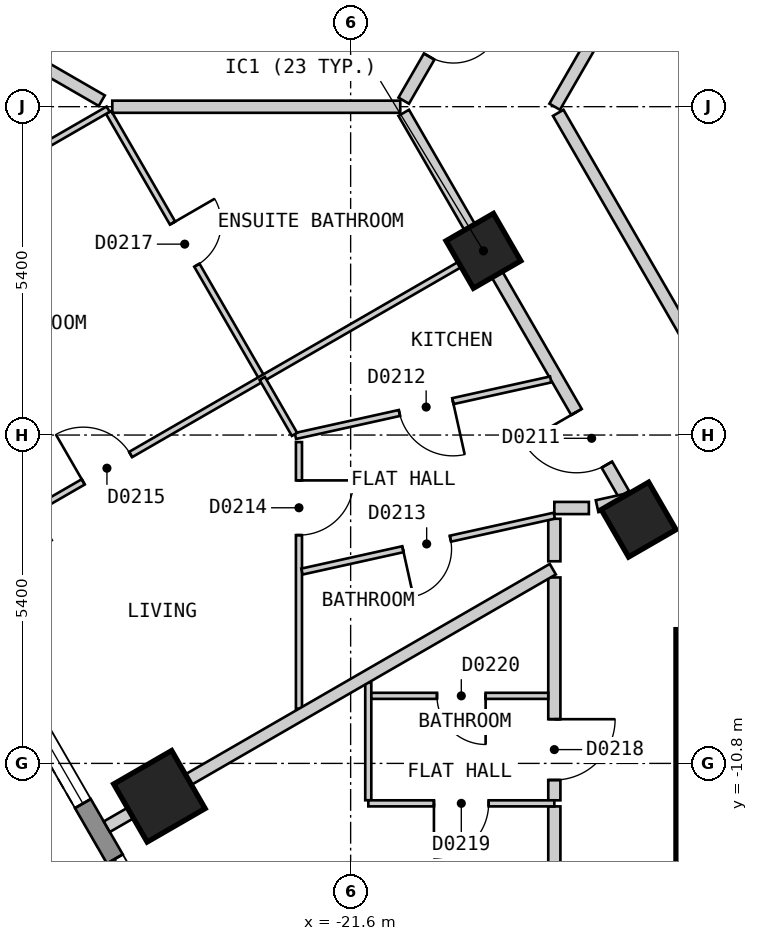
"""IFC4 building model, lengths in metres.
Left out: names, types, materials, properties, quantities, classifications, styles, units other than length and angle.
Written with IfcOpenShell. Run it as: python <this file> out.ifc"""

import sys

from ifc_helpers import new_model, si_unit, direction, frame, frame_2d, origin, origin_2d, place, context, subcontext, project, spatial, polyline, rectangle, outline, extrude, element, fill, save


model = new_model("IFC4")
c1 = context("Model", 3, precision=1e-05, world=origin(), true_north=direction((0.0, 1.0)))
c2 = subcontext(c1, "Body", "Model", "MODEL_VIEW")
j1 = project(units=[si_unit("LENGTHUNIT", "METRE"), si_unit("PLANEANGLEUNIT", "RADIAN")], contexts=[c1])
p1 = place(None, origin())
s1 = spatial("IfcSite", under=j1, at=p1, CompositionType="ELEMENT")
p2 = place(p1, origin())
s2 = spatial("IfcBuilding", under=s1, at=p2, CompositionType="ELEMENT")
p3 = place(p2, frame((0.0, 0.0, 41.4)))
s3 = spatial("IfcBuildingStorey", under=s2, at=p3, CompositionType="ELEMENT", Elevation=41.4)
p4 = place(p3, frame((-24.745, -11.341, 0.0), z_axis=(0.0, 0.0, 1.0), x_axis=(0.499984884929, -0.866034130299, 0.0)))
e1 = element("IfcColumn", 1, at=p4, inside=s3, PredefinedType="COLUMN", context=c2, shape_type="SweptSolid", body=[
    extrude(rectangle(XDim=1.1, YDim=1.1, at=origin_2d()), origin(), (0.0, 0.0, 1.0), 3.0),
])
for number, where, z_axis, x_axis in (
    (2, (-19.416, -2.371, 0.0), (0.0, 0.0, 1.0), (0.5, -0.866, 0.0)),
    (3, (-16.864, -6.791, 0.0), (0.0, 0.0, 1.0), (0.5, -0.866, 0.0)),
):
    element("IfcColumn", number, at=place(p3, frame(where, z_axis=z_axis, x_axis=x_axis)), inside=s3, PredefinedType="COLUMN", context=c2, shape_type="SweptSolid", body=[
        extrude(rectangle(XDim=0.9, YDim=0.9, at=origin_2d()), origin(), (0.0, 0.0, 1.0), 3.0),
    ])
p5 = place(p3, frame((-31.22, -2.425, 0.0), z_axis=(0.0, 0.0, 1.0), x_axis=(0.500001938803, -0.866024284413, 0.0)))
e4 = element("IfcWall", 4, at=p5, inside=s3, PredefinedType="SOLIDWALL", context=c2, shape_type="SweptSolid", body=[
    extrude(outline(polyline([(0.0, -0.15), (27.02, -0.15), (26.94, 0.15), (0.08, 0.15), (0.0, -0.15)])), origin(), (0.0, 0.0, 1.0), 2.7),
])
p6 = place(p5, frame((1.277, 0.0, 0.15)))
e5 = element("IfcOpeningElement", 5, at=p6, cuts=e4, PredefinedType="OPENING", context=c2, shape_type="SweptSolid", body=[
    extrude(rectangle(XDim=1.5, YDim=2.1, at=frame_2d((0.75, 1.05))), frame((0.0, 0.16, 0.0), z_axis=(0.0, -1.0, 0.0), x_axis=(1.0, 0.0, 0.0)), (0.0, 0.0, 1.0), 0.32),
])
p7 = place(p5, frame((3.829, 0.0, 0.15)))
e6 = element("IfcOpeningElement", 6, at=p7, cuts=e4, PredefinedType="OPENING", context=c2, shape_type="SweptSolid", body=[
    extrude(rectangle(XDim=1.5, YDim=2.1, at=frame_2d((0.75, 1.05))), frame((0.0, 0.16, 0.0), z_axis=(0.0, -1.0, 0.0), x_axis=(1.0, 0.0, 0.0)), (0.0, 0.0, 1.0), 0.32),
])
p8 = place(p5, frame((6.382, 0.0, 0.15)))
e7 = element("IfcOpeningElement", 7, at=p8, cuts=e4, PredefinedType="OPENING", context=c2, shape_type="SweptSolid", body=[
    extrude(rectangle(XDim=1.5, YDim=2.1, at=frame_2d((0.75, 1.05))), frame((0.0, 0.16, 0.0), z_axis=(0.0, -1.0, 0.0), x_axis=(1.0, 0.0, 0.0)), (0.0, 0.0, 1.0), 0.32),
])
p9 = place(p5, frame((8.933, 0.0, 0.15)))
e8 = element("IfcOpeningElement", 8, at=p9, cuts=e4, PredefinedType="OPENING", context=c2, shape_type="SweptSolid", body=[
    extrude(rectangle(XDim=1.5, YDim=2.1, at=frame_2d((0.75, 1.05))), frame((0.0, 0.16, 0.0), z_axis=(0.0, -1.0, 0.0), x_axis=(1.0, 0.0, 0.0)), (0.0, 0.0, 1.0), 0.32),
])
p10 = place(p5, frame((11.485, 0.0, 0.15)))
e9 = element("IfcOpeningElement", 9, at=p10, cuts=e4, PredefinedType="OPENING", context=c2, shape_type="SweptSolid", body=[
    extrude(rectangle(XDim=1.5, YDim=2.1, at=frame_2d((0.75, 1.05))), frame((0.0, 0.16, 0.0), z_axis=(0.0, -1.0, 0.0), x_axis=(1.0, 0.0, 0.0)), (0.0, 0.0, 1.0), 0.32),
])
p11 = place(p5, frame((14.037, 0.0, 0.15)))
e10 = element("IfcOpeningElement", 10, at=p11, cuts=e4, PredefinedType="OPENING", context=c2, shape_type="SweptSolid", body=[
    extrude(rectangle(XDim=1.5, YDim=2.1, at=frame_2d((0.75, 1.05))), frame((0.0, 0.16, 0.0), z_axis=(0.0, -1.0, 0.0), x_axis=(1.0, 0.0, 0.0)), (0.0, 0.0, 1.0), 0.32),
])
p12 = place(p5, frame((16.589, 0.0, 0.15)))
e11 = element("IfcOpeningElement", 11, at=p12, cuts=e4, PredefinedType="OPENING", context=c2, shape_type="SweptSolid", body=[
    extrude(rectangle(XDim=1.5, YDim=2.1, at=frame_2d((0.75, 1.05))), frame((0.0, 0.16, 0.0), z_axis=(0.0, -1.0, 0.0), x_axis=(1.0, 0.0, 0.0)), (0.0, 0.0, 1.0), 0.32),
])
p13 = place(p5, frame((19.141, 0.0, 0.15)))
e12 = element("IfcOpeningElement", 12, at=p13, cuts=e4, PredefinedType="OPENING", context=c2, shape_type="SweptSolid", body=[
    extrude(rectangle(XDim=1.5, YDim=2.1, at=frame_2d((0.75, 1.05))), frame((0.0, 0.16, 0.0), z_axis=(0.0, -1.0, 0.0), x_axis=(1.0, 0.0, 0.0)), (0.0, 0.0, 1.0), 0.32),
])
p14 = place(p5, frame((21.693, 0.0, 0.15)))
e13 = element("IfcOpeningElement", 13, at=p14, cuts=e4, PredefinedType="OPENING", context=c2, shape_type="SweptSolid", body=[
    extrude(rectangle(XDim=1.5, YDim=2.1, at=frame_2d((0.75, 1.05))), frame((0.0, 0.16, 0.0), z_axis=(0.0, -1.0, 0.0), x_axis=(1.0, 0.0, 0.0)), (0.0, 0.0, 1.0), 0.32),
])
p15 = place(p5, frame((24.244, 0.0, 0.15)))
e14 = element("IfcOpeningElement", 14, at=p15, cuts=e4, PredefinedType="OPENING", context=c2, shape_type="SweptSolid", body=[
    extrude(rectangle(XDim=1.5, YDim=2.1, at=frame_2d((0.75, 1.05))), frame((0.0, 0.16, 0.0), z_axis=(0.0, -1.0, 0.0), x_axis=(1.0, 0.0, 0.0)), (0.0, 0.0, 1.0), 0.32),
])
p16 = place(p3, frame((-18.186, -0.101, 0.0), z_axis=(0.0, 0.0, 1.0), x_axis=(0.499997591167, -0.86602679452, 0.0)))
e15 = element("IfcWall", 15, at=p16, inside=s3, PredefinedType="PARTITIONING", context=c2, shape_type="SweptSolid", body=[
    extrude(rectangle(XDim=5.172, YDim=0.2, at=frame_2d((2.586, 0.0))), origin(), (0.0, 0.0, 1.0), 2.7),
])
p17 = place(p3, frame((-20.727, -0.101, 0.0), z_axis=(0.0, 0.0, 1.0), x_axis=(0.500070814966, -0.865984514884, 0.0)))
e16 = element("IfcWall", 16, at=p17, inside=s3, PredefinedType="PARTITIONING", context=c2, shape_type="SweptSolid", body=[
    extrude(rectangle(XDim=7.239, YDim=0.2, at=frame_2d((3.62, 0.0))), origin(), (0.0, 0.0, 1.0), 2.7),
])
p18 = place(p17, frame((5.681, 0.0, 0.0)))
e17 = element("IfcOpeningElement", 17, at=p18, cuts=e16, PredefinedType="OPENING", context=c2, shape_type="SweptSolid", body=[
    extrude(rectangle(XDim=1.0, YDim=2.1, at=frame_2d((0.5, 1.05))), frame((0.0, 0.11, 0.0), z_axis=(0.0, -1.0, 0.0), x_axis=(1.0, 0.0, 0.0)), (0.0, 0.0, 1.0), 0.22),
])
p19 = place(p3, frame((-18.25, -11.507, 0.0), z_axis=(0.0, 0.0, 1.0), x_axis=(0.0, -1.0, 0.0)))
e18 = element("IfcWall", 18, at=p19, inside=s3, PredefinedType="PARTITIONING", context=c2, shape_type="SweptSolid", body=[
    extrude(rectangle(XDim=4.792, YDim=0.2, at=frame_2d((2.396, 0.0))), origin(), (0.0, 0.0, 1.0), 2.7),
])
p20 = place(p3, frame((-18.25, -6.6, 0.0), z_axis=(0.0, 0.0, 1.0), x_axis=(1.0, 0.0, 0.0)))
e19 = element("IfcWall", 19, at=p20, inside=s3, PredefinedType="PARTITIONING", context=c2, shape_type="SweptSolid", body=[
    extrude(rectangle(XDim=0.568, YDim=0.2, at=frame_2d((0.284, 0.0))), origin(), (0.0, 0.0, 1.0), 2.7),
])
p21 = place(p3, frame((-18.244, -0.001, 0.0), z_axis=(0.0, 0.0, 1.0), x_axis=(0.499962999376, 0.866046765051, 0.0)))
e20 = element("IfcWall", 20, at=p21, inside=s3, PredefinedType="PARTITIONING", context=c2, shape_type="SweptSolid", body=[
    extrude(rectangle(XDim=18.245, YDim=0.2, at=frame_2d((9.123, 0.0))), origin(), (0.0, 0.0, 1.0), 2.7),
])
p22 = place(p21, frame((8.672, 0.0, 0.0)))
e21 = element("IfcOpeningElement", 21, at=p22, cuts=e20, PredefinedType="OPENING", context=c2, shape_type="SweptSolid", body=[
    extrude(rectangle(XDim=0.9, YDim=2.1, at=frame_2d((0.45, 1.05))), frame((0.0, 0.11, 0.0), z_axis=(0.0, -1.0, 0.0), x_axis=(1.0, 0.0, 0.0)), (0.0, 0.0, 1.0), 0.22),
])
p23 = place(p3, frame((-20.727, 0.099, 0.0), z_axis=(0.0, 0.0, 1.0), x_axis=(0.499993204491, 0.866029327138, 0.0)))
e22 = element("IfcWall", 22, at=p23, inside=s3, PredefinedType="PARTITIONING", context=c2, shape_type="SweptSolid", body=[
    extrude(rectangle(XDim=20.554, YDim=0.2, at=frame_2d((10.277, 0.0))), origin(), (0.0, 0.0, 1.0), 2.7),
])
p24 = place(p23, frame((14.88, 0.0, 0.0)))
e23 = element("IfcOpeningElement", 23, at=p24, cuts=e22, PredefinedType="OPENING", context=c2, shape_type="SweptSolid", body=[
    extrude(rectangle(XDim=1.0, YDim=2.1, at=frame_2d((0.5, 1.05))), frame((0.0, 0.11, 0.0), z_axis=(0.0, -1.0, 0.0), x_axis=(1.0, 0.0, 0.0)), (0.0, 0.0, 1.0), 0.22),
])
p25 = place(p23, frame((4.673, 0.0, 0.0)))
e24 = element("IfcOpeningElement", 24, at=p25, cuts=e22, PredefinedType="OPENING", context=c2, shape_type="SweptSolid", body=[
    extrude(rectangle(XDim=1.0, YDim=2.1, at=frame_2d((0.5, 1.05))), frame((0.0, 0.11, 0.0), z_axis=(0.0, -1.0, 0.0), x_axis=(1.0, 0.0, 0.0)), (0.0, 0.0, 1.0), 0.22),
])
p26 = place(p23, frame((0.838, 0.0, 0.0)))
e25 = element("IfcOpeningElement", 25, at=p26, cuts=e22, PredefinedType="OPENING", context=c2, shape_type="SweptSolid", body=[
    extrude(rectangle(XDim=0.8, YDim=2.1, at=frame_2d((0.4, 1.05))), frame((0.0, 0.11, 0.0), z_axis=(0.0, -1.0, 0.0), x_axis=(1.0, 0.0, 0.0)), (0.0, 0.0, 1.0), 0.22),
])
p27 = place(p3, frame((-18.25, -11.407, 0.0), z_axis=(0.0, 0.0, 1.0), x_axis=(0.0, 1.0, 0.0)))
e26 = element("IfcWall", 26, at=p27, inside=s3, PredefinedType="PARTITIONING", context=c2, shape_type="SweptSolid", body=[
    extrude(rectangle(XDim=3.665, YDim=0.2, at=frame_2d((1.833, 0.0))), origin(), (0.0, 0.0, 1.0), 2.7),
])
p28 = place(p27, frame((0.334, 0.0, 0.0)))
e27 = element("IfcOpeningElement", 27, at=p28, cuts=e26, PredefinedType="OPENING", context=c2, shape_type="SweptSolid", body=[
    extrude(rectangle(XDim=1.0, YDim=2.1, at=frame_2d((0.5, 1.05))), frame((0.0, 0.11, 0.0), z_axis=(0.0, -1.0, 0.0), x_axis=(1.0, 0.0, 0.0)), (0.0, 0.0, 1.0), 0.22),
])
p29 = place(p3, frame((-18.25, -7.476, 0.0), z_axis=(0.0, 0.0, 1.0), x_axis=(0.0, 1.0, 0.0)))
e28 = element("IfcWall", 28, at=p29, inside=s3, PredefinedType="PARTITIONING", context=c2, shape_type="SweptSolid", body=[
    extrude(rectangle(XDim=0.699, YDim=0.2, at=frame_2d((0.35, 0.0))), origin(), (0.0, 0.0, 1.0), 2.7),
])
p30 = place(p3, frame((-25.58, -0.094, 0.0), z_axis=(0.0, 0.0, 1.0), x_axis=(0.500093258202, -0.865971554441, 0.0)))
e29 = element("IfcWall", 29, at=p30, inside=s3, PredefinedType="PARTITIONING", context=c2, shape_type="SweptSolid", body=[
    extrude(rectangle(XDim=5.053, YDim=0.1, at=frame_2d((2.527, 0.0))), origin(), (0.0, 0.0, 1.0), 2.7),
])
p31 = place(p30, frame((2.102, 0.0, 0.0)))
e30 = element("IfcOpeningElement", 30, at=p31, cuts=e29, PredefinedType="OPENING", context=c2, shape_type="SweptSolid", body=[
    extrude(rectangle(XDim=0.8, YDim=2.1, at=frame_2d((0.4, 1.05))), frame((0.0, 0.06, 0.0), z_axis=(0.0, -1.0, 0.0), x_axis=(1.0, 0.0, 0.0)), (0.0, 0.0, 1.0), 0.12),
])
p32 = place(p3, frame((-21.31, -9.474, 0.0), z_axis=(0.0, 0.0, 1.0), x_axis=(0.0, -1.0, 0.0)))
e31 = element("IfcWall", 31, at=p32, inside=s3, PredefinedType="PARTITIONING", context=c2, shape_type="SweptSolid", body=[
    extrude(rectangle(XDim=1.932, YDim=0.1, at=frame_2d((0.966, 0.0))), origin(), (0.0, 0.0, 1.0), 2.7),
])
p33 = place(p3, frame((-21.26, -9.689, 0.0), z_axis=(0.0, 0.0, 1.0), x_axis=(1.0, 0.0, 0.0)))
e32 = element("IfcWall", 32, at=p33, inside=s3, PredefinedType="PARTITIONING", context=c2, shape_type="SweptSolid", body=[
    extrude(rectangle(XDim=2.91, YDim=0.1, at=frame_2d((1.455, 0.0))), origin(), (0.0, 0.0, 1.0), 2.7),
])
p34 = place(p33, frame((1.08, 0.0, 0.0)))
e33 = element("IfcOpeningElement", 33, at=p34, cuts=e32, PredefinedType="OPENING", context=c2, shape_type="SweptSolid", body=[
    extrude(rectangle(XDim=0.8, YDim=2.1, at=frame_2d((0.4, 1.05))), frame((0.0, 0.06, 0.0), z_axis=(0.0, -1.0, 0.0), x_axis=(1.0, 0.0, 0.0)), (0.0, 0.0, 1.0), 0.12),
])
p35 = place(p3, frame((-21.309, -11.457, 0.0), z_axis=(0.0, 0.0, 1.0), x_axis=(1.0, 0.0, 0.0)))
e34 = element("IfcWall", 34, at=p35, inside=s3, PredefinedType="PARTITIONING", context=c2, shape_type="SweptSolid", body=[
    extrude(rectangle(XDim=3.059, YDim=0.1, at=frame_2d((1.53, 0.0))), origin(), (0.0, 0.0, 1.0), 2.7),
])
p36 = place(p35, frame((1.079, 0.0, 0.0)))
e35 = element("IfcOpeningElement", 35, at=p36, cuts=e34, PredefinedType="OPENING", context=c2, shape_type="SweptSolid", body=[
    extrude(rectangle(XDim=0.9, YDim=2.1, at=frame_2d((0.45, 1.05))), frame((0.0, 0.06, 0.0), z_axis=(0.0, -1.0, 0.0), x_axis=(1.0, 0.0, 0.0)), (0.0, 0.0, 1.0), 0.12),
])
p37 = place(p3, frame((-22.45, -9.901, 0.0), z_axis=(0.0, 0.0, 1.0), x_axis=(0.0, 1.0, 0.0)))
e36 = element("IfcWall", 36, at=p37, inside=s3, PredefinedType="PARTITIONING", context=c2, shape_type="SweptSolid", body=[
    extrude(rectangle(XDim=4.385, YDim=0.1, at=frame_2d((2.192, 0.0))), origin(), (0.0, 0.0, 1.0), 2.7),
])
p38 = place(p37, frame((2.855, 0.0, 0.0)))
e37 = element("IfcOpeningElement", 37, at=p38, cuts=e36, PredefinedType="OPENING", context=c2, shape_type="SweptSolid", body=[
    extrude(rectangle(XDim=0.9, YDim=2.1, at=frame_2d((0.45, 1.05))), frame((0.0, 0.06, 0.0), z_axis=(0.0, -1.0, 0.0), x_axis=(1.0, 0.0, 0.0)), (0.0, 0.0, 1.0), 0.12),
])
p39 = place(p3, frame((-22.508, -5.416, 0.0), z_axis=(0.0, 0.0, 1.0), x_axis=(0.976332464286, 0.216275100696, 0.0)))
e38 = element("IfcWall", 38, at=p39, inside=s3, PredefinedType="PARTITIONING", context=c2, shape_type="SweptSolid", body=[
    extrude(rectangle(XDim=4.3, YDim=0.1, at=frame_2d((2.15, 0.0))), origin(), (0.0, 0.0, 1.0), 2.7),
])
p40 = place(p39, frame((1.752, 0.0, 0.0)))
e39 = element("IfcOpeningElement", 39, at=p40, cuts=e38, PredefinedType="OPENING", context=c2, shape_type="SweptSolid", body=[
    extrude(rectangle(XDim=0.9, YDim=2.1, at=frame_2d((0.45, 1.05))), frame((0.0, 0.06, 0.0), z_axis=(0.0, -1.0, 0.0), x_axis=(1.0, 0.0, 0.0)), (0.0, 0.0, 1.0), 0.12),
])
p41 = place(p3, frame((-22.4, -7.645, 0.0), z_axis=(0.0, 0.0, 1.0), x_axis=(0.97634896822, 0.216200583385, 0.0)))
e40 = element("IfcWall", 40, at=p41, inside=s3, PredefinedType="PARTITIONING", context=c2, shape_type="SweptSolid", body=[
    extrude(rectangle(XDim=4.25, YDim=0.1, at=frame_2d((2.125, 0.0))), origin(), (0.0, 0.0, 1.0), 2.7),
])
p42 = place(p41, frame((1.7, 0.0, 0.0)))
e41 = element("IfcOpeningElement", 41, at=p42, cuts=e40, PredefinedType="OPENING", context=c2, shape_type="SweptSolid", body=[
    extrude(rectangle(XDim=0.8, YDim=2.1, at=frame_2d((0.4, 1.05))), frame((0.0, 0.06, 0.0), z_axis=(0.0, -1.0, 0.0), x_axis=(1.0, 0.0, 0.0)), (0.0, 0.0, 1.0), 0.12),
])
p43 = place(p3, frame((-28.163, -7.42, 0.0), z_axis=(0.0, 0.0, 1.0), x_axis=(0.866065245018, 0.499930986609, 0.0)))
e42 = element("IfcWall", 42, at=p43, inside=s3, PredefinedType="PARTITIONING", context=c2, shape_type="SweptSolid", body=[
    extrude(rectangle(XDim=10.0, YDim=0.1, at=frame_2d((5.0, 0.0))), origin(), (0.0, 0.0, 1.0), 2.7),
])
p44 = place(p43, frame((2.5, 0.0, 0.0)))
e43 = element("IfcOpeningElement", 43, at=p44, cuts=e42, PredefinedType="OPENING", context=c2, shape_type="SweptSolid", body=[
    extrude(rectangle(XDim=0.9, YDim=2.1, at=frame_2d((0.45, 1.05))), frame((0.0, 0.06, 0.0), z_axis=(0.0, -1.0, 0.0), x_axis=(1.0, 0.0, 0.0)), (0.0, 0.0, 1.0), 0.12),
])
p45 = place(p3, frame((-30.715, -3.0, 0.0), z_axis=(0.0, 0.0, 1.0), x_axis=(0.866113484451, 0.499847408768, 0.0)))
e44 = element("IfcWall", 44, at=p45, inside=s3, PredefinedType="PARTITIONING", context=c2, shape_type="SweptSolid", body=[
    extrude(rectangle(XDim=5.92, YDim=0.1, at=frame_2d((2.96, 0.0))), origin(), (0.0, 0.0, 1.0), 2.7),
])
p46 = place(p45, frame((2.51, 0.0, 0.0)))
e45 = element("IfcOpeningElement", 45, at=p46, cuts=e44, PredefinedType="OPENING", context=c2, shape_type="SweptSolid", body=[
    extrude(rectangle(XDim=0.9, YDim=2.1, at=frame_2d((0.45, 1.05))), frame((0.0, 0.06, 0.0), z_axis=(0.0, -1.0, 0.0), x_axis=(1.0, 0.0, 0.0)), (0.0, 0.0, 1.0), 0.12),
])
p47 = place(p3, frame((-30.716, 2.999, 0.0), z_axis=(0.0, 0.0, 1.0), x_axis=(0.866032775405, -0.499987231761, 0.0)))
e46 = element("IfcWall", 46, at=p47, inside=s3, PredefinedType="PARTITIONING", context=c2, shape_type="SweptSolid", body=[
    extrude(rectangle(XDim=5.8, YDim=0.2, at=frame_2d((2.9, 0.0))), origin(), (0.0, 0.0, 1.0), 2.7),
])
p48 = place(p3, frame((-25.52, -0.001, 0.0), z_axis=(0.0, 0.0, 1.0), x_axis=(1.0, 0.0, 0.0)))
e47 = element("IfcWall", 47, at=p48, inside=s3, PredefinedType="PARTITIONING", context=c2, shape_type="SweptSolid", body=[
    extrude(rectangle(XDim=4.736, YDim=0.2, at=frame_2d((2.368, 0.0))), origin(), (0.0, 0.0, 1.0), 2.7),
])
p49 = place(p3, frame((-17.547, -6.57, 0.0), z_axis=(0.0, 0.0, 1.0), x_axis=(0.97647747569, 0.215619432033, 0.0)))
e48 = element("IfcWall", 48, at=p49, inside=s3, PredefinedType="PARTITIONING", context=c2, shape_type="SweptSolid", body=[
    extrude(rectangle(XDim=0.473, YDim=0.2, at=frame_2d((0.237, 0.0))), origin(), (0.0, 0.0, 1.0), 2.7),
])
p50 = place(p3, frame((-25.61, -11.841, 0.0), z_axis=(0.0, 0.0, 1.0), x_axis=(0.866019023803, 0.500011050288, 0.0)))
e49 = element("IfcWall", 49, at=p50, inside=s3, PredefinedType="PARTITIONING", context=c2, shape_type="SweptSolid", body=[
    extrude(rectangle(XDim=8.47, YDim=0.2, at=frame_2d((4.235, 0.0))), origin(), (0.0, 0.0, 1.0), 2.7),
])
p51 = place(p3, frame((-23.053, -4.47, 0.0), z_axis=(0.0, 0.0, 1.0), x_axis=(0.499629475903, -0.866239220313, 0.0)))
e50 = element("IfcWall", 50, at=p51, inside=s3, PredefinedType="PARTITIONING", context=c2, shape_type="SweptSolid", body=[
    extrude(rectangle(XDim=1.061, YDim=0.1, at=frame_2d((0.53, 0.0))), origin(), (0.0, 0.0, 1.0), 2.7),
])
p52 = place(p3, frame((-16.15, -14.4, 0.0), z_axis=(0.0, 0.0, 1.0), x_axis=(0.0, 1.0, 0.0)))
e51 = element("IfcWall", 51, at=p52, inside=s3, PredefinedType="SOLIDWALL", context=c2, shape_type="SweptSolid", body=[
    extrude(rectangle(XDim=5.8, YDim=0.2, at=frame_2d((2.9, 0.0))), origin(), (0.0, 0.0, 1.0), 2.7),
])
p53 = place(p9, origin())
e52 = element("IfcWindow", 52, at=p53, inside=s3, PartitioningType="SINGLE_PANEL", PredefinedType="WINDOW", context=c2, shape_type="SweptSolid", body=[
    extrude(rectangle(XDim=1.5, YDim=2.1, at=frame_2d((0.75, 1.05))), frame((0.0, 0.03, 0.0), z_axis=(0.0, -1.0, 0.0), x_axis=(1.0, 0.0, 0.0)), (0.0, 0.0, 1.0), 0.06),
])
fill(e8, e52)
p54 = place(p10, origin())
e53 = element("IfcWindow", 53, at=p54, inside=s3, PartitioningType="SINGLE_PANEL", PredefinedType="WINDOW", context=c2, shape_type="SweptSolid", body=[
    extrude(rectangle(XDim=1.5, YDim=2.1, at=frame_2d((0.75, 1.05))), frame((0.0, 0.03, 0.0), z_axis=(0.0, -1.0, 0.0), x_axis=(1.0, 0.0, 0.0)), (0.0, 0.0, 1.0), 0.06),
])
fill(e9, e53)
p55 = place(p26, origin())
e54 = element("IfcDoor", 54, at=p55, inside=s3, OperationType="SINGLE_SWING_RIGHT", PredefinedType="DOOR", context=c2, shape_type="SweptSolid", body=[
    extrude(rectangle(XDim=0.8, YDim=2.1, at=frame_2d((0.4, 1.05))), frame((0.0, 0.025, 0.0), z_axis=(0.0, -1.0, 0.0), x_axis=(1.0, 0.0, 0.0)), (0.0, 0.0, 1.0), 0.05),
])
fill(e25, e54)
p56 = place(p18, origin())
e55 = element("IfcDoor", 55, at=p56, inside=s3, OperationType="SINGLE_SWING_LEFT", PredefinedType="DOOR", context=c2, shape_type="SweptSolid", body=[
    extrude(rectangle(XDim=1.0, YDim=2.1, at=frame_2d((0.5, 1.05))), frame((0.0, 0.025, 0.0), z_axis=(0.0, -1.0, 0.0), x_axis=(1.0, 0.0, 0.0)), (0.0, 0.0, 1.0), 0.05),
])
fill(e17, e55)
p57 = place(p40, origin())
e56 = element("IfcDoor", 56, at=p57, inside=s3, OperationType="SINGLE_SWING_RIGHT", PredefinedType="DOOR", context=c2, shape_type="SweptSolid", body=[
    extrude(rectangle(XDim=0.9, YDim=2.1, at=frame_2d((0.45, 1.05))), frame((0.0, 0.025, 0.0), z_axis=(0.0, -1.0, 0.0), x_axis=(1.0, 0.0, 0.0)), (0.0, 0.0, 1.0), 0.05),
])
fill(e39, e56)
p58 = place(p42, origin())
e57 = element("IfcDoor", 57, at=p58, inside=s3, OperationType="SINGLE_SWING_LEFT", PredefinedType="DOOR", context=c2, shape_type="SweptSolid", body=[
    extrude(rectangle(XDim=0.8, YDim=2.1, at=frame_2d((0.4, 1.05))), frame((0.0, 0.025, 0.0), z_axis=(0.0, -1.0, 0.0), x_axis=(1.0, 0.0, 0.0)), (0.0, 0.0, 1.0), 0.05),
])
fill(e41, e57)
p59 = place(p38, origin())
e58 = element("IfcDoor", 58, at=p59, inside=s3, OperationType="SINGLE_SWING_RIGHT", PredefinedType="DOOR", context=c2, shape_type="SweptSolid", body=[
    extrude(rectangle(XDim=0.9, YDim=2.1, at=frame_2d((0.45, 1.05))), frame((0.0, 0.025, 0.0), z_axis=(0.0, -1.0, 0.0), x_axis=(1.0, 0.0, 0.0)), (0.0, 0.0, 1.0), 0.05),
])
fill(e37, e58)
p60 = place(p44, origin())
e59 = element("IfcDoor", 59, at=p60, inside=s3, OperationType="SINGLE_SWING_LEFT", PredefinedType="DOOR", context=c2, shape_type="SweptSolid", body=[
    extrude(rectangle(XDim=0.9, YDim=2.1, at=frame_2d((0.45, 1.05))), frame((0.0, 0.025, 0.0), z_axis=(0.0, -1.0, 0.0), x_axis=(1.0, 0.0, 0.0)), (0.0, 0.0, 1.0), 0.05),
])
fill(e43, e59)
p61 = place(p31, origin())
e60 = element("IfcDoor", 60, at=p61, inside=s3, OperationType="SINGLE_SWING_LEFT", PredefinedType="DOOR", context=c2, shape_type="SweptSolid", body=[
    extrude(rectangle(XDim=0.8, YDim=2.1, at=frame_2d((0.4, 1.05))), frame((0.0, 0.025, 0.0), z_axis=(0.0, -1.0, 0.0), x_axis=(1.0, 0.0, 0.0)), (0.0, 0.0, 1.0), 0.05),
])
fill(e30, e60)
p62 = place(p28, origin())
e61 = element("IfcDoor", 61, at=p62, inside=s3, OperationType="SINGLE_SWING_RIGHT", PredefinedType="DOOR", context=c2, shape_type="SweptSolid", body=[
    extrude(rectangle(XDim=1.0, YDim=2.1, at=frame_2d((0.5, 1.05))), frame((0.0, 0.025, 0.0), z_axis=(0.0, -1.0, 0.0), x_axis=(1.0, 0.0, 0.0)), (0.0, 0.0, 1.0), 0.05),
])
fill(e27, e61)
p63 = place(p36, origin())
e62 = element("IfcDoor", 62, at=p63, inside=s3, OperationType="SINGLE_SWING_LEFT", PredefinedType="DOOR", context=c2, shape_type="SweptSolid", body=[
    extrude(rectangle(XDim=0.9, YDim=2.1, at=frame_2d((0.45, 1.05))), frame((0.0, 0.025, 0.0), z_axis=(0.0, -1.0, 0.0), x_axis=(1.0, 0.0, 0.0)), (0.0, 0.0, 1.0), 0.05),
])
fill(e35, e62)
p64 = place(p34, origin())
e63 = element("IfcDoor", 63, at=p64, inside=s3, OperationType="SINGLE_SWING_RIGHT", PredefinedType="DOOR", context=c2, shape_type="SweptSolid", body=[
    extrude(rectangle(XDim=0.8, YDim=2.1, at=frame_2d((0.4, 1.05))), frame((0.0, 0.025, 0.0), z_axis=(0.0, -1.0, 0.0), x_axis=(1.0, 0.0, 0.0)), (0.0, 0.0, 1.0), 0.05),
])
fill(e33, e63)
save(model, sys.argv[1])
